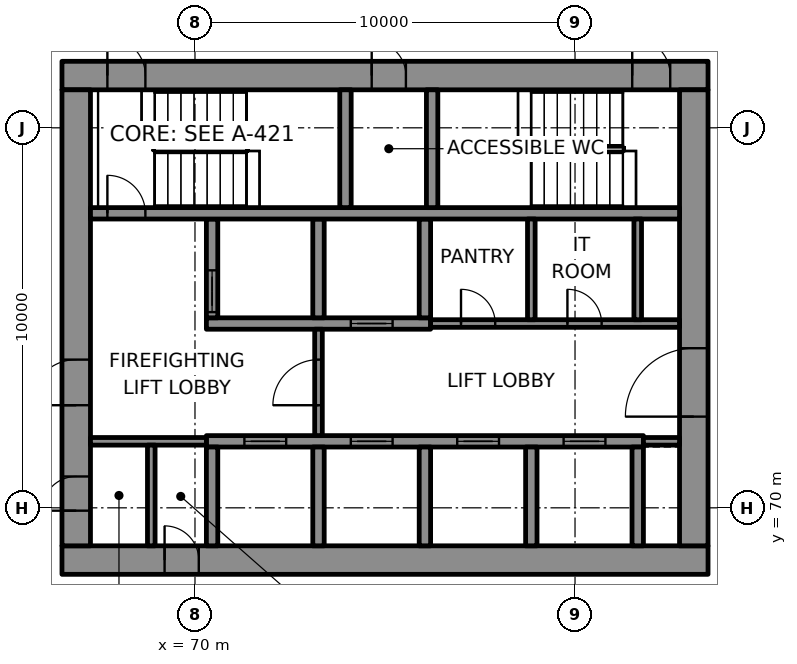
"""IFC4 building model, lengths in metres.
Left out: names, types, materials, properties, quantities, classifications, styles, units other than length and angle.
Written with IfcOpenShell. Run it as: python <this file> out.ifc"""

import sys

from ifc_helpers import new_model, si_unit, direction, frame, frame_2d, origin, place, context, subcontext, project, spatial, rectangle, extrude, element, fill, save


model = new_model("IFC4")
c1 = context("Model", 3, precision=1e-05, world=origin(), true_north=direction((0.0, 1.0)))
c2 = subcontext(c1, "Body", "Model", "MODEL_VIEW")
j1 = project(units=[si_unit("LENGTHUNIT", "METRE"), si_unit("PLANEANGLEUNIT", "RADIAN")], contexts=[c1])
p1 = place(None, origin())
s1 = spatial("IfcSite", under=j1, at=p1, CompositionType="ELEMENT")
p2 = place(p1, origin())
s2 = spatial("IfcBuilding", under=s1, at=p2, CompositionType="ELEMENT")
p3 = place(p2, frame((0.0, 0.0, 326.6)))
s3 = spatial("IfcBuildingStorey", under=s2, at=p3, CompositionType="ELEMENT", Elevation=326.6)
p4 = place(p3, frame((66.5, 68.625, 0.0), z_axis=(0.0, 0.0, 1.0), x_axis=(1.0, 0.0, 0.0)))
e1 = element("IfcWall", 1, at=p4, inside=s3, PredefinedType="SHEAR", context=c2, shape_type="SweptSolid", body=[
    extrude(rectangle(XDim=17.0, YDim=0.75, at=frame_2d((8.5, 0.0))), origin(), (0.0, 0.0, 1.0), 4.7),
])
p5 = place(p4, frame((2.7, 0.0, 0.0)))
e2 = element("IfcOpeningElement", 2, at=p5, cuts=e1, PredefinedType="OPENING", context=c2, shape_type="SweptSolid", body=[
    extrude(rectangle(XDim=0.9, YDim=2.1, at=frame_2d((0.45, 1.05))), frame((0.0, 0.385, 0.0), z_axis=(0.0, -1.0, 0.0), x_axis=(1.0, 0.0, 0.0)), (0.0, 0.0, 1.0), 0.77),
])
p6 = place(p3, frame((66.5, 81.375, 0.0), z_axis=(0.0, 0.0, 1.0), x_axis=(1.0, 0.0, 0.0)))
e3 = element("IfcWall", 3, at=p6, inside=s3, PredefinedType="SHEAR", context=c2, shape_type="SweptSolid", body=[
    extrude(rectangle(XDim=17.0, YDim=0.75, at=frame_2d((8.5, 0.0))), origin(), (0.0, 0.0, 1.0), 4.7),
])
p7 = place(p6, frame((1.195, 0.0, 0.0)))
e4 = element("IfcOpeningElement", 4, at=p7, cuts=e3, PredefinedType="OPENING", context=c2, shape_type="SweptSolid", body=[
    extrude(rectangle(XDim=1.0, YDim=2.1, at=frame_2d((0.5, 1.05))), frame((0.0, 0.385, 0.0), z_axis=(0.0, -1.0, 0.0), x_axis=(1.0, 0.0, 0.0)), (0.0, 0.0, 1.0), 0.77),
])
p8 = place(p6, frame((15.005, 0.0, 0.0)))
e5 = element("IfcOpeningElement", 5, at=p8, cuts=e3, PredefinedType="OPENING", context=c2, shape_type="SweptSolid", body=[
    extrude(rectangle(XDim=1.0, YDim=2.1, at=frame_2d((0.5, 1.05))), frame((0.0, 0.385, 0.0), z_axis=(0.0, -1.0, 0.0), x_axis=(1.0, 0.0, 0.0)), (0.0, 0.0, 1.0), 0.77),
])
p9 = place(p6, frame((8.15, 0.0, 0.0)))
e6 = element("IfcOpeningElement", 6, at=p9, cuts=e3, PredefinedType="OPENING", context=c2, shape_type="SweptSolid", body=[
    extrude(rectangle(XDim=0.9, YDim=2.1, at=frame_2d((0.45, 1.05))), frame((0.0, 0.385, 0.0), z_axis=(0.0, -1.0, 0.0), x_axis=(1.0, 0.0, 0.0)), (0.0, 0.0, 1.0), 0.77),
])
p10 = place(p3, frame((66.875, 69.0, 0.0), z_axis=(0.0, 0.0, 1.0), x_axis=(0.0, 1.0, 0.0)))
e7 = element("IfcWall", 7, at=p10, inside=s3, PredefinedType="SHEAR", context=c2, shape_type="SweptSolid", body=[
    extrude(rectangle(XDim=12.0, YDim=0.75, at=frame_2d((6.0, 0.0))), origin(), (0.0, 0.0, 1.0), 4.7),
])
p11 = place(p10, frame((3.7, 0.0, 0.0)))
e8 = element("IfcOpeningElement", 8, at=p11, cuts=e7, PredefinedType="OPENING", context=c2, shape_type="SweptSolid", body=[
    extrude(rectangle(XDim=1.2, YDim=2.1, at=frame_2d((0.6, 1.05))), frame((0.0, 0.385, 0.0), z_axis=(0.0, -1.0, 0.0), x_axis=(1.0, 0.0, 0.0)), (0.0, 0.0, 1.0), 0.77),
])
p12 = place(p10, frame((0.925, 0.0, 0.0)))
e9 = element("IfcOpeningElement", 9, at=p12, cuts=e7, PredefinedType="OPENING", context=c2, shape_type="SweptSolid", body=[
    extrude(rectangle(XDim=0.9, YDim=2.1, at=frame_2d((0.45, 1.05))), frame((0.0, 0.385, 0.0), z_axis=(0.0, -1.0, 0.0), x_axis=(1.0, 0.0, 0.0)), (0.0, 0.0, 1.0), 0.77),
])
p13 = place(p3, frame((83.125, 69.0, 0.0), z_axis=(0.0, 0.0, 1.0), x_axis=(0.0, 1.0, 0.0)))
e10 = element("IfcWall", 10, at=p13, inside=s3, PredefinedType="SHEAR", context=c2, shape_type="SweptSolid", body=[
    extrude(rectangle(XDim=12.0, YDim=0.75, at=frame_2d((6.0, 0.0))), origin(), (0.0, 0.0, 1.0), 4.7),
])
p14 = place(p13, frame((3.4, 0.0, 0.0)))
e11 = element("IfcOpeningElement", 11, at=p14, cuts=e10, PredefinedType="OPENING", context=c2, shape_type="SweptSolid", body=[
    extrude(rectangle(XDim=1.8, YDim=2.1, at=frame_2d((0.9, 1.05))), frame((0.0, 0.385, 0.0), z_axis=(0.0, -1.0, 0.0), x_axis=(1.0, 0.0, 0.0)), (0.0, 0.0, 1.0), 0.77),
])
p15 = place(p3, frame((70.3, 71.75, 0.0), z_axis=(0.0, 0.0, 1.0), x_axis=(1.0, 0.0, 0.0)))
e12 = element("IfcWall", 12, at=p15, inside=s3, PredefinedType="SHEAR", context=c2, shape_type="SweptSolid", body=[
    extrude(rectangle(XDim=11.5, YDim=0.3, at=frame_2d((5.75, 0.0))), origin(), (0.0, 0.0, 1.0), 4.7),
])
p16 = place(p15, frame((1.0, 0.0, 0.0)))
e13 = element("IfcOpeningElement", 13, at=p16, cuts=e12, PredefinedType="OPENING", context=c2, shape_type="SweptSolid", body=[
    extrude(rectangle(XDim=1.1, YDim=2.1, at=frame_2d((0.55, 1.05))), frame((0.0, 0.16, 0.0), z_axis=(0.0, -1.0, 0.0), x_axis=(1.0, 0.0, 0.0)), (0.0, 0.0, 1.0), 0.32),
])
p17 = place(p15, frame((3.8, 0.0, 0.0)))
e14 = element("IfcOpeningElement", 14, at=p17, cuts=e12, PredefinedType="OPENING", context=c2, shape_type="SweptSolid", body=[
    extrude(rectangle(XDim=1.1, YDim=2.1, at=frame_2d((0.55, 1.05))), frame((0.0, 0.16, 0.0), z_axis=(0.0, -1.0, 0.0), x_axis=(1.0, 0.0, 0.0)), (0.0, 0.0, 1.0), 0.32),
])
p18 = place(p15, frame((6.6, 0.0, 0.0)))
e15 = element("IfcOpeningElement", 15, at=p18, cuts=e12, PredefinedType="OPENING", context=c2, shape_type="SweptSolid", body=[
    extrude(rectangle(XDim=1.1, YDim=2.1, at=frame_2d((0.55, 1.05))), frame((0.0, 0.16, 0.0), z_axis=(0.0, -1.0, 0.0), x_axis=(1.0, 0.0, 0.0)), (0.0, 0.0, 1.0), 0.32),
])
p19 = place(p15, frame((9.4, 0.0, 0.0)))
e16 = element("IfcOpeningElement", 16, at=p19, cuts=e12, PredefinedType="OPENING", context=c2, shape_type="SweptSolid", body=[
    extrude(rectangle(XDim=1.1, YDim=2.1, at=frame_2d((0.55, 1.05))), frame((0.0, 0.16, 0.0), z_axis=(0.0, -1.0, 0.0), x_axis=(1.0, 0.0, 0.0)), (0.0, 0.0, 1.0), 0.32),
])
p20 = place(p3, frame((70.3, 74.85, 0.0), z_axis=(0.0, 0.0, 1.0), x_axis=(1.0, 0.0, 0.0)))
e17 = element("IfcWall", 17, at=p20, inside=s3, PredefinedType="SHEAR", context=c2, shape_type="SweptSolid", body=[
    extrude(rectangle(XDim=5.9, YDim=0.3, at=frame_2d((2.95, 0.0))), origin(), (0.0, 0.0, 1.0), 4.7),
])
p21 = place(p20, frame((3.8, 0.0, 0.0)))
e18 = element("IfcOpeningElement", 18, at=p21, cuts=e17, PredefinedType="OPENING", context=c2, shape_type="SweptSolid", body=[
    extrude(rectangle(XDim=1.1, YDim=2.1, at=frame_2d((0.55, 1.05))), frame((0.0, 0.16, 0.0), z_axis=(0.0, -1.0, 0.0), x_axis=(1.0, 0.0, 0.0)), (0.0, 0.0, 1.0), 0.32),
])
p22 = place(p3, frame((70.45, 69.0, 0.0), z_axis=(0.0, 0.0, 1.0), x_axis=(0.0, 1.0, 0.0)))
e19 = element("IfcWall", 19, at=p22, inside=s3, PredefinedType="SHEAR", context=c2, shape_type="SweptSolid", body=[
    extrude(rectangle(XDim=2.6, YDim=0.3, at=frame_2d((1.3, 0.0))), origin(), (0.0, 0.0, 1.0), 4.7),
])
p23 = place(p3, frame((70.45, 75.0, 0.0), z_axis=(0.0, 0.0, 1.0), x_axis=(0.0, 1.0, 0.0)))
e20 = element("IfcWall", 20, at=p23, inside=s3, PredefinedType="SHEAR", context=c2, shape_type="SweptSolid", body=[
    extrude(rectangle(XDim=2.6, YDim=0.3, at=frame_2d((1.3, 0.0))), origin(), (0.0, 0.0, 1.0), 4.7),
])
p24 = place(p23, frame((0.15, 0.0, 0.0)))
e21 = element("IfcOpeningElement", 21, at=p24, cuts=e20, PredefinedType="OPENING", context=c2, shape_type="SweptSolid", body=[
    extrude(rectangle(XDim=1.1, YDim=2.1, at=frame_2d((0.55, 1.05))), frame((0.0, 0.16, 0.0), z_axis=(0.0, -1.0, 0.0), x_axis=(1.0, 0.0, 0.0)), (0.0, 0.0, 1.0), 0.32),
])
for number, where, z_axis, x_axis in (
    (22, (73.25, 69.0, 0.0), (0.0, 0.0, 1.0), (0.0, 1.0, 0.0)),
    (23, (73.25, 75.0, 0.0), (0.0, 0.0, 1.0), (0.0, 1.0, 0.0)),
    (24, (76.05, 69.0, 0.0), (0.0, 0.0, 1.0), (0.0, 1.0, 0.0)),
    (25, (76.05, 75.0, 0.0), (0.0, 0.0, 1.0), (0.0, 1.0, 0.0)),
    (26, (78.85, 69.0, 0.0), (0.0, 0.0, 1.0), (0.0, 1.0, 0.0)),
    (27, (81.65, 69.0, 0.0), (0.0, 0.0, 1.0), (0.0, 1.0, 0.0)),
):
    element("IfcWall", number, at=place(p3, frame(where, z_axis=z_axis, x_axis=x_axis)), inside=s3, PredefinedType="SHEAR", context=c2, shape_type="SweptSolid", body=[
        extrude(rectangle(XDim=2.6, YDim=0.3, at=frame_2d((1.3, 0.0))), origin(), (0.0, 0.0, 1.0), 4.7),
    ])
p25 = place(p3, frame((67.25, 77.75, 0.0), z_axis=(0.0, 0.0, 1.0), x_axis=(1.0, 0.0, 0.0)))
e28 = element("IfcWall", 28, at=p25, inside=s3, PredefinedType="SHEAR", context=c2, shape_type="SweptSolid", body=[
    extrude(rectangle(XDim=15.5, YDim=0.3, at=frame_2d((7.75, 0.0))), origin(), (0.0, 0.0, 1.0), 4.7),
])
p26 = place(p25, frame((0.445, 0.0, 0.0)))
e29 = element("IfcOpeningElement", 29, at=p26, cuts=e28, PredefinedType="OPENING", context=c2, shape_type="SweptSolid", body=[
    extrude(rectangle(XDim=1.0, YDim=2.1, at=frame_2d((0.5, 1.05))), frame((0.0, 0.16, 0.0), z_axis=(0.0, -1.0, 0.0), x_axis=(1.0, 0.0, 0.0)), (0.0, 0.0, 1.0), 0.32),
])
for number, where, z_axis, x_axis in (
    (30, (73.96, 77.9, 0.0), (0.0, 0.0, 1.0), (0.0, 1.0, 0.0)),
    (31, (76.24, 77.9, 0.0), (0.0, 0.0, 1.0), (0.0, 1.0, 0.0)),
):
    element("IfcWall", number, at=place(p3, frame(where, z_axis=z_axis, x_axis=x_axis)), inside=s3, PredefinedType="SHEAR", context=c2, shape_type="SweptSolid", body=[
        extrude(rectangle(XDim=3.1, YDim=0.3, at=frame_2d((1.55, 0.0))), origin(), (0.0, 0.0, 1.0), 4.7),
    ])
p27 = place(p3, frame((67.25, 71.75, 0.0), z_axis=(0.0, 0.0, 1.0), x_axis=(1.0, 0.0, 0.0)))
e32 = element("IfcWall", 32, at=p27, inside=s3, PredefinedType="PARTITIONING", context=c2, shape_type="SweptSolid", body=[
    extrude(rectangle(XDim=3.05, YDim=0.2, at=frame_2d((1.525, 0.0))), origin(), (0.0, 0.0, 1.0), 4.7),
])
p28 = place(p3, frame((81.8, 71.75, 0.0), z_axis=(0.0, 0.0, 1.0), x_axis=(1.0, 0.0, 0.0)))
e33 = element("IfcWall", 33, at=p28, inside=s3, PredefinedType="PARTITIONING", context=c2, shape_type="SweptSolid", body=[
    extrude(rectangle(XDim=0.95, YDim=0.2, at=frame_2d((0.475, 0.0))), origin(), (0.0, 0.0, 1.0), 4.7),
])
p29 = place(p3, frame((76.2, 74.85, 0.0), z_axis=(0.0, 0.0, 1.0), x_axis=(1.0, 0.0, 0.0)))
e34 = element("IfcWall", 34, at=p29, inside=s3, PredefinedType="PARTITIONING", context=c2, shape_type="SweptSolid", body=[
    extrude(rectangle(XDim=6.55, YDim=0.2, at=frame_2d((3.275, 0.0))), origin(), (0.0, 0.0, 1.0), 4.7),
])
p30 = place(p29, frame((0.8, 0.0, 0.0)))
e35 = element("IfcOpeningElement", 35, at=p30, cuts=e34, PredefinedType="OPENING", context=c2, shape_type="SweptSolid", body=[
    extrude(rectangle(XDim=0.9, YDim=2.1, at=frame_2d((0.45, 1.05))), frame((0.0, 0.11, 0.0), z_axis=(0.0, -1.0, 0.0), x_axis=(1.0, 0.0, 0.0)), (0.0, 0.0, 1.0), 0.22),
])
p31 = place(p29, frame((3.6, 0.0, 0.0)))
e36 = element("IfcOpeningElement", 36, at=p31, cuts=e34, PredefinedType="OPENING", context=c2, shape_type="SweptSolid", body=[
    extrude(rectangle(XDim=0.9, YDim=2.1, at=frame_2d((0.45, 1.05))), frame((0.0, 0.11, 0.0), z_axis=(0.0, -1.0, 0.0), x_axis=(1.0, 0.0, 0.0)), (0.0, 0.0, 1.0), 0.22),
])
p32 = place(p3, frame((68.85, 69.0, 0.0), z_axis=(0.0, 0.0, 1.0), x_axis=(0.0, 1.0, 0.0)))
e37 = element("IfcWall", 37, at=p32, inside=s3, PredefinedType="PARTITIONING", context=c2, shape_type="SweptSolid", body=[
    extrude(rectangle(XDim=2.65, YDim=0.2, at=frame_2d((1.325, 0.0))), origin(), (0.0, 0.0, 1.0), 4.7),
])
p33 = place(p3, frame((73.25, 71.9, 0.0), z_axis=(0.0, 0.0, 1.0), x_axis=(0.0, 1.0, 0.0)))
e38 = element("IfcWall", 38, at=p33, inside=s3, PredefinedType="PARTITIONING", context=c2, shape_type="SweptSolid", body=[
    extrude(rectangle(XDim=2.8, YDim=0.2, at=frame_2d((1.4, 0.0))), origin(), (0.0, 0.0, 1.0), 4.7),
])
p34 = place(p33, frame((0.8, 0.0, 0.0)))
e39 = element("IfcOpeningElement", 39, at=p34, cuts=e38, PredefinedType="OPENING", context=c2, shape_type="SweptSolid", body=[
    extrude(rectangle(XDim=1.2, YDim=2.1, at=frame_2d((0.6, 1.05))), frame((0.0, 0.11, 0.0), z_axis=(0.0, -1.0, 0.0), x_axis=(1.0, 0.0, 0.0)), (0.0, 0.0, 1.0), 0.22),
])
for number, where, z_axis, x_axis in (
    (40, (78.85, 74.95, 0.0), (0.0, 0.0, 1.0), (0.0, 1.0, 0.0)),
    (41, (81.65, 74.95, 0.0), (0.0, 0.0, 1.0), (0.0, 1.0, 0.0)),
):
    element("IfcWall", number, at=place(p3, frame(where, z_axis=z_axis, x_axis=x_axis)), inside=s3, PredefinedType="PARTITIONING", context=c2, shape_type="SweptSolid", body=[
        extrude(rectangle(XDim=2.65, YDim=0.2, at=frame_2d((1.325, 0.0))), origin(), (0.0, 0.0, 1.0), 4.7),
    ])
p35 = place(p16, origin())
e42 = element("IfcDoor", 42, at=p35, inside=s3, OperationType="DOUBLE_DOOR_SLIDING", PredefinedType="DOOR", context=c2, shape_type="SweptSolid", body=[
    extrude(rectangle(XDim=1.1, YDim=2.1, at=frame_2d((0.55, 1.05))), frame((0.0, 0.025, 0.0), z_axis=(0.0, -1.0, 0.0), x_axis=(1.0, 0.0, 0.0)), (0.0, 0.0, 1.0), 0.05),
])
fill(e13, e42)
p36 = place(p17, origin())
e43 = element("IfcDoor", 43, at=p36, inside=s3, OperationType="DOUBLE_DOOR_SLIDING", PredefinedType="DOOR", context=c2, shape_type="SweptSolid", body=[
    extrude(rectangle(XDim=1.1, YDim=2.1, at=frame_2d((0.55, 1.05))), frame((0.0, 0.025, 0.0), z_axis=(0.0, -1.0, 0.0), x_axis=(1.0, 0.0, 0.0)), (0.0, 0.0, 1.0), 0.05),
])
fill(e14, e43)
p37 = place(p18, origin())
e44 = element("IfcDoor", 44, at=p37, inside=s3, OperationType="DOUBLE_DOOR_SLIDING", PredefinedType="DOOR", context=c2, shape_type="SweptSolid", body=[
    extrude(rectangle(XDim=1.1, YDim=2.1, at=frame_2d((0.55, 1.05))), frame((0.0, 0.025, 0.0), z_axis=(0.0, -1.0, 0.0), x_axis=(1.0, 0.0, 0.0)), (0.0, 0.0, 1.0), 0.05),
])
fill(e15, e44)
p38 = place(p19, origin())
e45 = element("IfcDoor", 45, at=p38, inside=s3, OperationType="DOUBLE_DOOR_SLIDING", PredefinedType="DOOR", context=c2, shape_type="SweptSolid", body=[
    extrude(rectangle(XDim=1.1, YDim=2.1, at=frame_2d((0.55, 1.05))), frame((0.0, 0.025, 0.0), z_axis=(0.0, -1.0, 0.0), x_axis=(1.0, 0.0, 0.0)), (0.0, 0.0, 1.0), 0.05),
])
fill(e16, e45)
p39 = place(p24, origin())
e46 = element("IfcDoor", 46, at=p39, inside=s3, OperationType="DOUBLE_DOOR_SLIDING", PredefinedType="DOOR", context=c2, shape_type="SweptSolid", body=[
    extrude(rectangle(XDim=1.1, YDim=2.1, at=frame_2d((0.55, 1.05))), frame((0.0, 0.025, 0.0), z_axis=(0.0, -1.0, 0.0), x_axis=(1.0, 0.0, 0.0)), (0.0, 0.0, 1.0), 0.05),
])
fill(e21, e46)
p40 = place(p21, origin())
e47 = element("IfcDoor", 47, at=p40, inside=s3, OperationType="DOUBLE_DOOR_SLIDING", PredefinedType="DOOR", context=c2, shape_type="SweptSolid", body=[
    extrude(rectangle(XDim=1.1, YDim=2.1, at=frame_2d((0.55, 1.05))), frame((0.0, 0.025, 0.0), z_axis=(0.0, -1.0, 0.0), x_axis=(1.0, 0.0, 0.0)), (0.0, 0.0, 1.0), 0.05),
])
fill(e18, e47)
p41 = place(p26, origin())
e48 = element("IfcDoor", 48, at=p41, inside=s3, OperationType="SINGLE_SWING_LEFT", PredefinedType="DOOR", context=c2, shape_type="SweptSolid", body=[
    extrude(rectangle(XDim=1.0, YDim=2.1, at=frame_2d((0.5, 1.05))), frame((0.0, 0.025, 0.0), z_axis=(0.0, -1.0, 0.0), x_axis=(1.0, 0.0, 0.0)), (0.0, 0.0, 1.0), 0.05),
])
fill(e29, e48)
p42 = place(p7, origin())
e49 = element("IfcDoor", 49, at=p42, inside=s3, OperationType="SINGLE_SWING_RIGHT", PredefinedType="DOOR", context=c2, shape_type="SweptSolid", body=[
    extrude(rectangle(XDim=1.0, YDim=2.1, at=frame_2d((0.5, 1.05))), frame((0.0, 0.095, 0.0), z_axis=(0.0, -1.0, 0.0), x_axis=(1.0, 0.0, 0.0)), (0.0, 0.0, 1.0), 0.19),
])
fill(e4, e49)
p43 = place(p8, origin())
e50 = element("IfcDoor", 50, at=p43, inside=s3, OperationType="SINGLE_SWING_LEFT", PredefinedType="DOOR", context=c2, shape_type="SweptSolid", body=[
    extrude(rectangle(XDim=1.0, YDim=2.1, at=frame_2d((0.5, 1.05))), frame((0.0, 0.095, 0.0), z_axis=(0.0, -1.0, 0.0), x_axis=(1.0, 0.0, 0.0)), (0.0, 0.0, 1.0), 0.19),
])
fill(e5, e50)
p44 = place(p34, origin())
e51 = element("IfcDoor", 51, at=p44, inside=s3, OperationType="SINGLE_SWING_LEFT", PredefinedType="DOOR", context=c2, shape_type="SweptSolid", body=[
    extrude(rectangle(XDim=1.2, YDim=2.1, at=frame_2d((0.6, 1.05))), frame((0.0, 0.025, 0.0), z_axis=(0.0, -1.0, 0.0), x_axis=(1.0, 0.0, 0.0)), (0.0, 0.0, 1.0), 0.05),
])
fill(e39, e51)
p45 = place(p11, origin())
e52 = element("IfcDoor", 52, at=p45, inside=s3, OperationType="SINGLE_SWING_RIGHT", PredefinedType="DOOR", context=c2, shape_type="SweptSolid", body=[
    extrude(rectangle(XDim=1.2, YDim=2.1, at=frame_2d((0.6, 1.05))), frame((0.0, 0.095, 0.0), z_axis=(0.0, -1.0, 0.0), x_axis=(1.0, 0.0, 0.0)), (0.0, 0.0, 1.0), 0.19),
])
fill(e8, e52)
p46 = place(p14, origin())
e53 = element("IfcDoor", 53, at=p46, inside=s3, OperationType="SINGLE_SWING_LEFT", PredefinedType="DOOR", context=c2, shape_type="SweptSolid", body=[
    extrude(rectangle(XDim=1.8, YDim=2.1, at=frame_2d((0.9, 1.05))), frame((0.0, 0.095, 0.0), z_axis=(0.0, -1.0, 0.0), x_axis=(1.0, 0.0, 0.0)), (0.0, 0.0, 1.0), 0.19),
])
fill(e11, e53)
p47 = place(p12, origin())
e54 = element("IfcDoor", 54, at=p47, inside=s3, OperationType="SINGLE_SWING_RIGHT", PredefinedType="DOOR", context=c2, shape_type="SweptSolid", body=[
    extrude(rectangle(XDim=0.9, YDim=2.1, at=frame_2d((0.45, 1.05))), frame((0.0, 0.095, 0.0), z_axis=(0.0, -1.0, 0.0), x_axis=(1.0, 0.0, 0.0)), (0.0, 0.0, 1.0), 0.19),
])
fill(e9, e54)
p48 = place(p5, origin())
e55 = element("IfcDoor", 55, at=p48, inside=s3, OperationType="SINGLE_SWING_LEFT", PredefinedType="DOOR", context=c2, shape_type="SweptSolid", body=[
    extrude(rectangle(XDim=0.9, YDim=2.1, at=frame_2d((0.45, 1.05))), frame((0.0, 0.095, 0.0), z_axis=(0.0, -1.0, 0.0), x_axis=(1.0, 0.0, 0.0)), (0.0, 0.0, 1.0), 0.19),
])
fill(e2, e55)
p49 = place(p30, origin())
e56 = element("IfcDoor", 56, at=p49, inside=s3, OperationType="SINGLE_SWING_RIGHT", PredefinedType="DOOR", context=c2, shape_type="SweptSolid", body=[
    extrude(rectangle(XDim=0.9, YDim=2.1, at=frame_2d((0.45, 1.05))), frame((0.0, 0.025, 0.0), z_axis=(0.0, -1.0, 0.0), x_axis=(1.0, 0.0, 0.0)), (0.0, 0.0, 1.0), 0.05),
])
fill(e35, e56)
p50 = place(p31, origin())
e57 = element("IfcDoor", 57, at=p50, inside=s3, OperationType="SINGLE_SWING_LEFT", PredefinedType="DOOR", context=c2, shape_type="SweptSolid", body=[
    extrude(rectangle(XDim=0.9, YDim=2.1, at=frame_2d((0.45, 1.05))), frame((0.0, 0.025, 0.0), z_axis=(0.0, -1.0, 0.0), x_axis=(1.0, 0.0, 0.0)), (0.0, 0.0, 1.0), 0.05),
])
fill(e36, e57)
p51 = place(p9, origin())
e58 = element("IfcDoor", 58, at=p51, inside=s3, OperationType="SINGLE_SWING_RIGHT", PredefinedType="DOOR", context=c2, shape_type="SweptSolid", body=[
    extrude(rectangle(XDim=0.9, YDim=2.1, at=frame_2d((0.45, 1.05))), frame((0.0, 0.095, 0.0), z_axis=(0.0, -1.0, 0.0), x_axis=(1.0, 0.0, 0.0)), (0.0, 0.0, 1.0), 0.19),
])
fill(e6, e58)
save(model, sys.argv[1])
